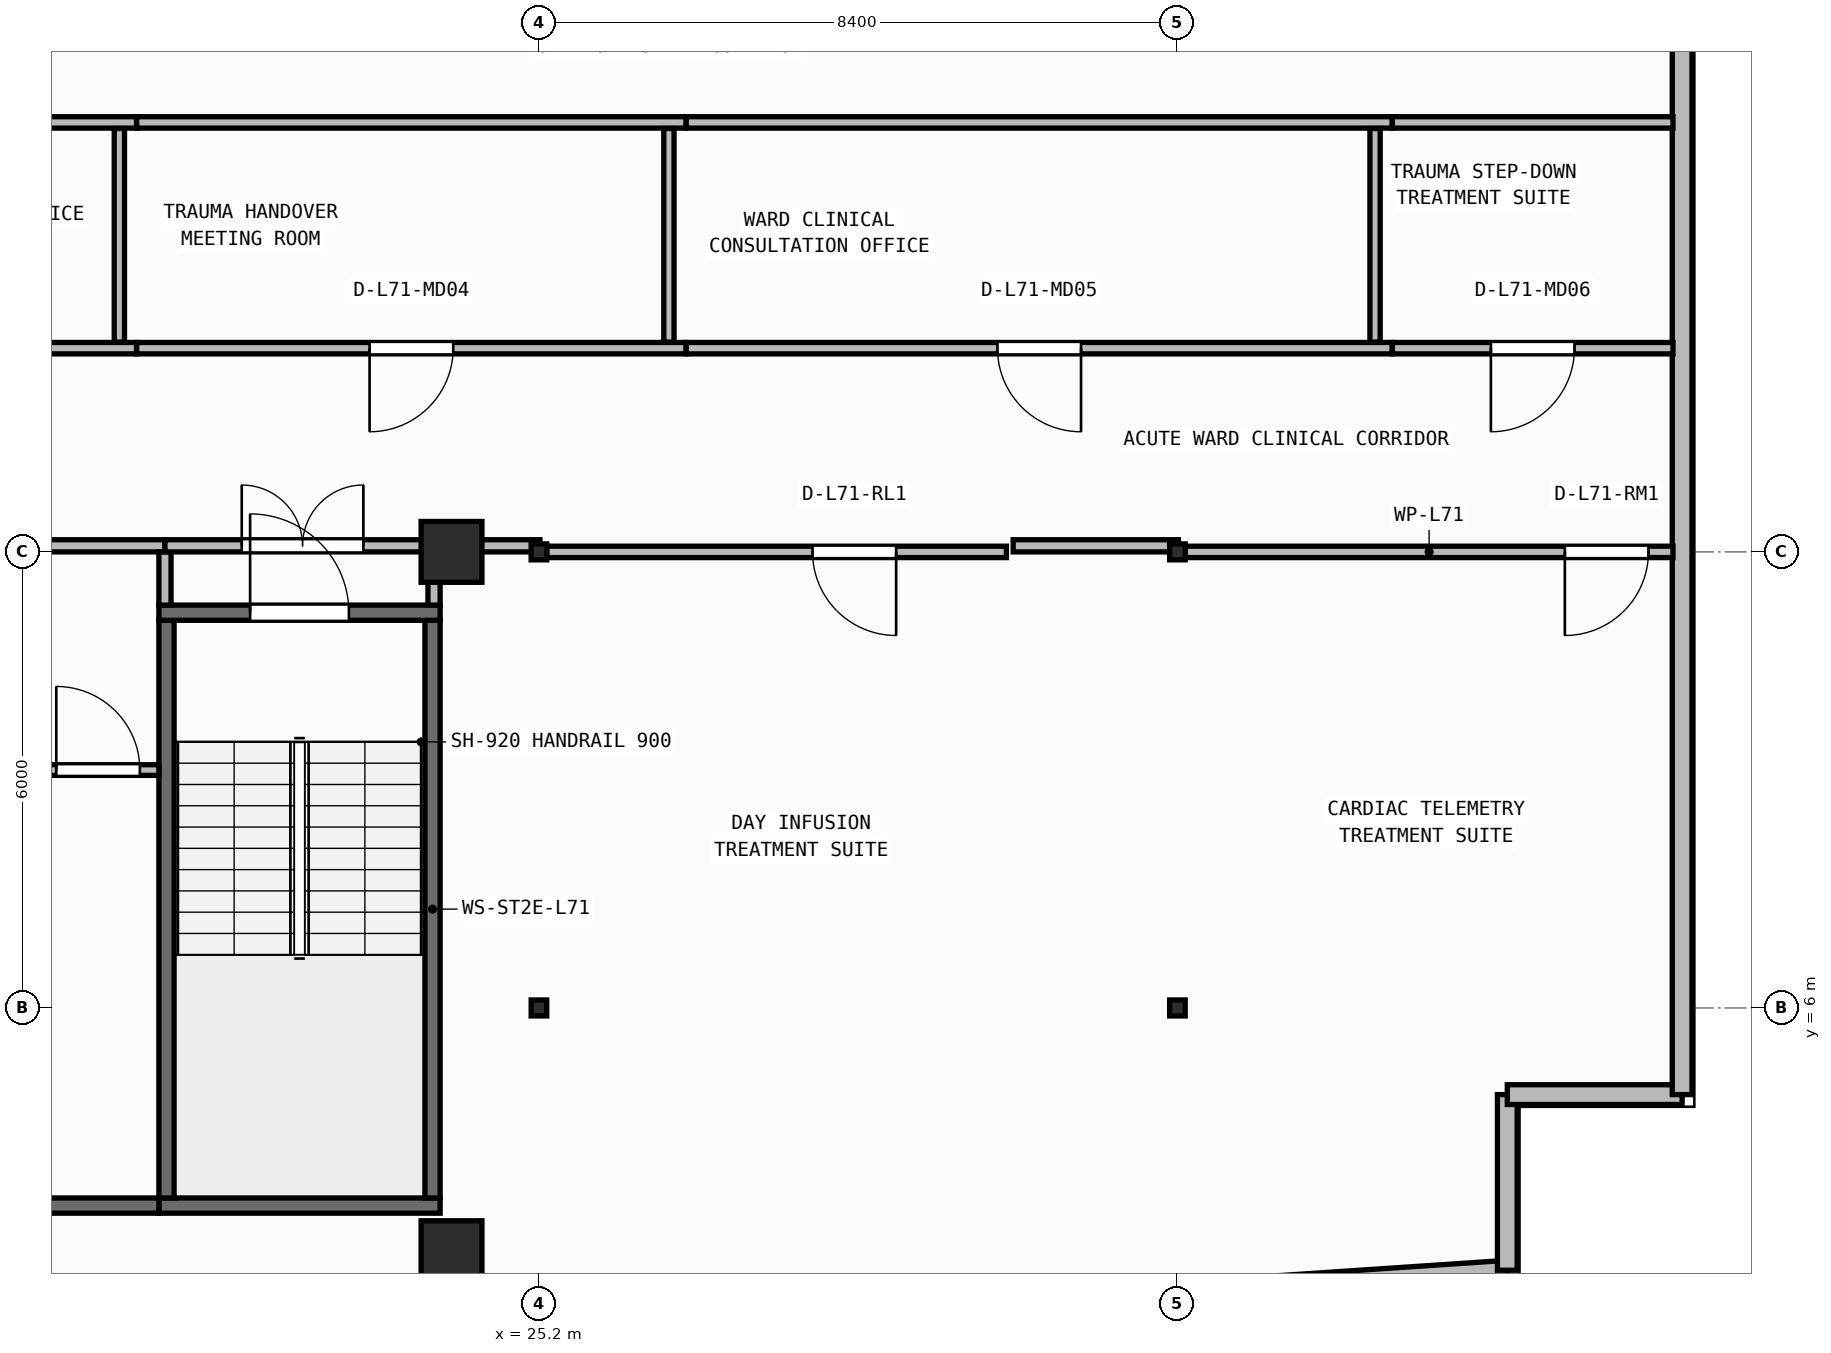
"""IFC4 building model, lengths in metres.
Left out: names, types, materials, properties, quantities, classifications, styles, units other than length and angle.
Written with IfcOpenShell. Run it as: python <this file> out.ifc"""

import sys

from ifc_helpers import new_model, si_unit, direction, frame, frame_2d, origin, origin_2d, place, context, subcontext, project, spatial, rectangle, i_section, extrude, element, fill, save


model = new_model("IFC4")
c1 = context("Model", 3, precision=1e-05, world=origin(), true_north=direction((0.0, 1.0)))
c2 = subcontext(c1, "Body", "Model", "MODEL_VIEW")
j1 = project(units=[si_unit("LENGTHUNIT", "METRE"), si_unit("PLANEANGLEUNIT", "RADIAN")], contexts=[c1])
p1 = place(None, origin())
s1 = spatial("IfcSite", under=j1, at=p1, CompositionType="ELEMENT")
p2 = place(p1, origin())
s2 = spatial("IfcBuilding", under=s1, at=p2, CompositionType="ELEMENT")
p3 = place(p2, frame((0.0, 0.0, 288.15)))
s3 = spatial("IfcBuildingStorey", under=s2, at=p3, CompositionType="ELEMENT", Elevation=288.15)
p4 = place(p3, frame((24.05, 2.8, 0.0), z_axis=(0.0, 0.0, 1.0), x_axis=(1.0, 0.0, 0.0)))
e1 = element("IfcColumn", 1, at=p4, inside=s3, PredefinedType="COLUMN", context=c2, shape_type="SweptSolid", body=[
    extrude(rectangle(XDim=0.8, YDim=0.8, at=origin_2d()), origin(), (0.0, 0.0, 1.0), 3.95),
])
for number, where, z_axis, x_axis in (
    (2, (25.2, 6.0, 0.0), (0.0, 0.0, 1.0), (1.0, 0.0, 0.0)),
    (3, (33.6, 6.0, 0.0), (0.0, 0.0, 1.0), (1.0, 0.0, 0.0)),
):
    element("IfcColumn", number, at=place(p3, frame(where, z_axis=z_axis, x_axis=x_axis)), inside=s3, PredefinedType="COLUMN", context=c2, shape_type="SweptSolid", body=[
        extrude(i_section(OverallWidth=0.205, OverallDepth=0.21, WebThickness=0.009, FlangeThickness=0.014, FilletRadius=0.011, at=origin_2d()), origin(), (0.0, 0.0, 1.0), 3.95),
    ])
p5 = place(p3, frame((24.05, 12.0, 0.0), z_axis=(0.0, 0.0, 1.0), x_axis=(1.0, 0.0, 0.0)))
e4 = element("IfcColumn", 4, at=p5, inside=s3, PredefinedType="COLUMN", context=c2, shape_type="SweptSolid", body=[
    extrude(rectangle(XDim=0.8, YDim=0.8, at=origin_2d()), origin(), (0.0, 0.0, 1.0), 3.95),
])
for number, where, z_axis, x_axis in (
    (5, (25.2, 12.0, 0.0), (0.0, 0.0, 1.0), (1.0, 0.0, 0.0)),
    (6, (33.6, 12.0, 0.0), (0.0, 0.0, 1.0), (1.0, 0.0, 0.0)),
):
    element("IfcColumn", number, at=place(p3, frame(where, z_axis=z_axis, x_axis=x_axis)), inside=s3, PredefinedType="COLUMN", context=c2, shape_type="SweptSolid", body=[
        extrude(i_section(OverallWidth=0.205, OverallDepth=0.21, WebThickness=0.009, FlangeThickness=0.014, FilletRadius=0.011, at=origin_2d()), origin(), (0.0, 0.0, 1.0), 3.95),
    ])
p6 = place(p3, frame((2.46, 0.171, 0.0), z_axis=(0.0, 0.0, 1.0), x_axis=(0.997760665813, 0.066885377746, 0.0)))
e7 = element("IfcWall", 7, at=p6, inside=s3, PredefinedType="STANDARD", context=c2, shape_type="SweptSolid", body=[
    extrude(rectangle(XDim=35.56, YDim=0.26, at=frame_2d((17.78, 0.0))), origin(), (0.0, 0.0, 1.0), 3.71),
])
p7 = place(p6, frame((16.58, 0.0, 0.9)))
e8 = element("IfcOpeningElement", 8, at=p7, cuts=e7, PredefinedType="OPENING", context=c2, shape_type="SweptSolid", body=[
    extrude(rectangle(XDim=2.4, YDim=1.65, at=frame_2d((1.2, 0.825))), frame((0.0, 0.14, 0.0), z_axis=(0.0, -1.0, 0.0), x_axis=(1.0, 0.0, 0.0)), (0.0, 0.0, 1.0), 0.28),
])
p8 = place(p3, frame((37.94, 2.55, 0.0), z_axis=(0.0, 0.0, 1.0), x_axis=(0.0, 1.0, 0.0)))
e9 = element("IfcWall", 9, at=p8, inside=s3, PredefinedType="STANDARD", context=c2, shape_type="SweptSolid", body=[
    extrude(rectangle(XDim=2.311, YDim=0.26, at=frame_2d((1.155, 0.0))), origin(), (0.0, 0.0, 1.0), 3.71),
])
p9 = place(p3, frame((37.94, 4.86, 0.0), z_axis=(0.0, 0.0, 1.0), x_axis=(1.0, 0.0, 0.0)))
e10 = element("IfcWall", 10, at=p9, inside=s3, PredefinedType="STANDARD", context=c2, shape_type="SweptSolid", body=[
    extrude(rectangle(XDim=2.3, YDim=0.26, at=frame_2d((1.15, 0.0))), origin(), (0.0, 0.0, 1.0), 3.71),
])
p10 = place(p3, frame((40.24, 4.86, 0.0), z_axis=(0.0, 0.0, 1.0), x_axis=(0.0, 1.0, 0.0)))
e11 = element("IfcWall", 11, at=p10, inside=s3, PredefinedType="STANDARD", context=c2, shape_type="SweptSolid", body=[
    extrude(rectangle(XDim=20.48, YDim=0.26, at=frame_2d((10.24, 0.0))), origin(), (0.0, 0.0, 1.0), 3.71),
])
p11 = place(p10, frame((15.445, 0.0, 0.9)))
e12 = element("IfcOpeningElement", 12, at=p11, cuts=e11, PredefinedType="OPENING", context=c2, shape_type="SweptSolid", body=[
    extrude(rectangle(XDim=2.4, YDim=1.65, at=frame_2d((1.2, 0.825))), frame((0.0, 0.14, 0.0), z_axis=(0.0, -1.0, 0.0), x_axis=(1.0, 0.0, 0.0)), (0.0, 0.0, 1.0), 0.28),
])
p12 = place(p3, frame((20.2, 3.4, 0.0), z_axis=(0.0, 0.0, 1.0), x_axis=(1.0, 0.0, 0.0)))
e13 = element("IfcWall", 13, at=p12, inside=s3, PredefinedType="SHEAR", context=c2, shape_type="SweptSolid", body=[
    extrude(rectangle(XDim=3.7, YDim=0.2, at=frame_2d((1.85, 0.0))), origin(), (0.0, 0.0, 1.0), 3.71),
])
for number, where, z_axis, x_axis in (
    (14, (20.3, 3.5, 0.0), (0.0, 0.0, 1.0), (0.0, 1.0, 0.0)),
    (15, (23.8, 3.5, 0.0), (0.0, 0.0, 1.0), (0.0, 1.0, 0.0)),
):
    element("IfcWall", number, at=place(p3, frame(where, z_axis=z_axis, x_axis=x_axis)), inside=s3, PredefinedType="SHEAR", context=c2, shape_type="SweptSolid", body=[
        extrude(rectangle(XDim=7.6, YDim=0.2, at=frame_2d((3.8, 0.0))), origin(), (0.0, 0.0, 1.0), 3.71),
    ])
p13 = place(p3, frame((20.2, 11.2, 0.0), z_axis=(0.0, 0.0, 1.0), x_axis=(1.0, 0.0, 0.0)))
e16 = element("IfcWall", 16, at=p13, inside=s3, PredefinedType="SHEAR", context=c2, shape_type="SweptSolid", body=[
    extrude(rectangle(XDim=3.7, YDim=0.2, at=frame_2d((1.85, 0.0))), origin(), (0.0, 0.0, 1.0), 3.71),
])
p14 = place(p13, frame((1.2, 0.0, 0.0)))
e17 = element("IfcOpeningElement", 17, at=p14, cuts=e16, PredefinedType="OPENING", context=c2, shape_type="SweptSolid", body=[
    extrude(rectangle(XDim=1.3, YDim=2.15, at=frame_2d((0.65, 1.075))), frame((0.0, 0.11, 0.0), z_axis=(0.0, -1.0, 0.0), x_axis=(1.0, 0.0, 0.0)), (0.0, 0.0, 1.0), 0.22),
])
p15 = place(p3, frame((6.5, 3.4, 0.0), z_axis=(0.0, 0.0, 1.0), x_axis=(1.0, 0.0, 0.0)))
e18 = element("IfcWall", 18, at=p15, inside=s3, PredefinedType="SHEAR", context=c2, shape_type="SweptSolid", body=[
    extrude(rectangle(XDim=13.7, YDim=0.2, at=frame_2d((6.85, 0.0))), origin(), (0.0, 0.0, 1.0), 3.71),
])
p16 = place(p3, frame((18.61, 9.13, 0.0), z_axis=(0.0, 0.0, 1.0), x_axis=(1.0, 0.0, 0.0)))
e19 = element("IfcWall", 19, at=p16, inside=s3, PredefinedType="PARTITIONING", context=c2, shape_type="SweptSolid", body=[
    extrude(rectangle(XDim=1.59, YDim=0.14, at=frame_2d((0.795, 0.0))), origin(), (0.0, 0.0, 1.0), 3.71),
])
p17 = place(p16, frame((0.24, 0.0, 0.0)))
e20 = element("IfcOpeningElement", 20, at=p17, cuts=e19, PredefinedType="OPENING", context=c2, shape_type="SweptSolid", body=[
    extrude(rectangle(XDim=1.1, YDim=2.1, at=frame_2d((0.55, 1.05))), frame((0.0, 0.08, 0.0), z_axis=(0.0, -1.0, 0.0), x_axis=(1.0, 0.0, 0.0)), (0.0, 0.0, 1.0), 0.16),
])
p18 = place(p3, frame((12.58, 12.08, 0.0), z_axis=(0.0, 0.0, 1.0), x_axis=(1.0, 0.0, 0.0)))
e21 = element("IfcWall", 21, at=p18, inside=s3, PredefinedType="PARTITIONING", context=c2, shape_type="SweptSolid", body=[
    extrude(rectangle(XDim=7.7, YDim=0.16, at=frame_2d((3.85, 0.0))), origin(), (0.0, 0.0, 1.0), 3.157),
])
p19 = place(p18, frame((3.05, 0.0, 0.0)))
e22 = element("IfcOpeningElement", 22, at=p19, cuts=e21, PredefinedType="OPENING", context=c2, shape_type="SweptSolid", body=[
    extrude(rectangle(XDim=1.6, YDim=2.05, at=frame_2d((0.8, 1.025))), frame((0.0, 0.09, 0.0), z_axis=(0.0, -1.0, 0.0), x_axis=(1.0, 0.0, 0.0)), (0.0, 0.0, 1.0), 0.18),
])
p20 = place(p3, frame((20.28, 11.3, 0.0), z_axis=(0.0, 0.0, 1.0), x_axis=(0.0, 1.0, 0.0)))
e23 = element("IfcWall", 23, at=p20, inside=s3, PredefinedType="PARTITIONING", context=c2, shape_type="SweptSolid", body=[
    extrude(rectangle(XDim=0.7, YDim=0.16, at=frame_2d((0.35, 0.0))), origin(), (0.0, 0.0, 1.0), 3.71),
])
p21 = place(p3, frame((20.28, 12.08, 0.0), z_axis=(0.0, 0.0, 1.0), x_axis=(1.0, 0.0, 0.0)))
e24 = element("IfcWall", 24, at=p21, inside=s3, PredefinedType="PARTITIONING", context=c2, shape_type="SweptSolid", body=[
    extrude(rectangle(XDim=3.62, YDim=0.16, at=frame_2d((1.81, 0.0))), origin(), (0.0, 0.0, 1.0), 3.157),
])
p22 = place(p21, frame((1.01, 0.0, 0.0)))
e25 = element("IfcOpeningElement", 25, at=p22, cuts=e24, PredefinedType="OPENING", context=c2, shape_type="SweptSolid", body=[
    extrude(rectangle(XDim=1.6, YDim=2.05, at=frame_2d((0.8, 1.025))), frame((0.0, 0.09, 0.0), z_axis=(0.0, -1.0, 0.0), x_axis=(1.0, 0.0, 0.0)), (0.0, 0.0, 1.0), 0.18),
])
p23 = place(p3, frame((23.82, 11.3, 0.0), z_axis=(0.0, 0.0, 1.0), x_axis=(0.0, 1.0, 0.0)))
e26 = element("IfcWall", 26, at=p23, inside=s3, PredefinedType="PARTITIONING", context=c2, shape_type="SweptSolid", body=[
    extrude(rectangle(XDim=0.7, YDim=0.16, at=frame_2d((0.35, 0.0))), origin(), (0.0, 0.0, 1.0), 3.71),
])
p24 = place(p3, frame((31.35, 12.0, 0.0), z_axis=(0.0, 0.0, 1.0), x_axis=(-1.0, 0.0, 0.0)))
e27 = element("IfcWall", 27, at=p24, inside=s3, PredefinedType="PARTITIONING", context=c2, shape_type="SweptSolid", body=[
    extrude(rectangle(XDim=6.048, YDim=0.15, at=frame_2d((3.024, 0.0))), origin(), (0.0, 0.0, 1.0), 3.157),
])
p25 = place(p24, frame((1.451, 0.0, 0.0)))
e28 = element("IfcOpeningElement", 28, at=p25, cuts=e27, PredefinedType="OPENING", context=c2, shape_type="SweptSolid", body=[
    extrude(rectangle(XDim=1.1, YDim=2.1, at=frame_2d((0.55, 1.05))), frame((0.0, 0.085, 0.0), z_axis=(0.0, -1.0, 0.0), x_axis=(1.0, 0.0, 0.0)), (0.0, 0.0, 1.0), 0.17),
])
p26 = place(p3, frame((40.12, 12.0, 0.0), z_axis=(0.0, 0.0, 1.0), x_axis=(-1.0, 0.0, 0.0)))
e29 = element("IfcWall", 29, at=p26, inside=s3, PredefinedType="PARTITIONING", context=c2, shape_type="SweptSolid", body=[
    extrude(rectangle(XDim=6.418, YDim=0.15, at=frame_2d((3.209, 0.0))), origin(), (0.0, 0.0, 1.0), 3.71),
])
p27 = place(p26, frame((0.323, 0.0, 0.0)))
e30 = element("IfcOpeningElement", 30, at=p27, cuts=e29, PredefinedType="OPENING", context=c2, shape_type="SweptSolid", body=[
    extrude(rectangle(XDim=1.1, YDim=2.1, at=frame_2d((0.55, 1.05))), frame((0.0, 0.085, 0.0), z_axis=(0.0, -1.0, 0.0), x_axis=(1.0, 0.0, 0.0)), (0.0, 0.0, 1.0), 0.17),
])
p28 = place(p3, frame((19.906, 14.68, 0.0), z_axis=(0.0, 0.0, 1.0), x_axis=(-1.0, 0.0, 0.0)))
e31 = element("IfcWall", 31, at=p28, inside=s3, PredefinedType="PARTITIONING", context=c2, shape_type="SweptSolid", body=[
    extrude(rectangle(XDim=6.352, YDim=0.15, at=frame_2d((3.176, 0.0))), origin(), (0.0, 0.0, 1.0), 3.71),
])
p29 = place(p28, frame((2.626, 0.0, 0.0)))
e32 = element("IfcOpeningElement", 32, at=p29, cuts=e31, PredefinedType="OPENING", context=c2, shape_type="SweptSolid", body=[
    extrude(rectangle(XDim=1.1, YDim=2.1, at=frame_2d((0.55, 1.05))), frame((0.0, 0.085, 0.0), z_axis=(0.0, -1.0, 0.0), x_axis=(1.0, 0.0, 0.0)), (0.0, 0.0, 1.0), 0.17),
])
p30 = place(p3, frame((27.136, 14.68, 0.0), z_axis=(0.0, 0.0, 1.0), x_axis=(-1.0, 0.0, 0.0)))
e33 = element("IfcWall", 33, at=p30, inside=s3, PredefinedType="PARTITIONING", context=c2, shape_type="SweptSolid", body=[
    extrude(rectangle(XDim=7.228, YDim=0.15, at=frame_2d((3.614, 0.0))), origin(), (0.0, 0.0, 1.0), 3.71),
])
p31 = place(p30, frame((3.064, 0.0, 0.0)))
e34 = element("IfcOpeningElement", 34, at=p31, cuts=e33, PredefinedType="OPENING", context=c2, shape_type="SweptSolid", body=[
    extrude(rectangle(XDim=1.1, YDim=2.1, at=frame_2d((0.55, 1.05))), frame((0.0, 0.085, 0.0), z_axis=(0.0, -1.0, 0.0), x_axis=(1.0, 0.0, 0.0)), (0.0, 0.0, 1.0), 0.17),
])
p32 = place(p3, frame((36.426, 14.68, 0.0), z_axis=(0.0, 0.0, 1.0), x_axis=(-1.0, 0.0, 0.0)))
e35 = element("IfcWall", 35, at=p32, inside=s3, PredefinedType="PARTITIONING", context=c2, shape_type="SweptSolid", body=[
    extrude(rectangle(XDim=9.288, YDim=0.15, at=frame_2d((4.644, 0.0))), origin(), (0.0, 0.0, 1.0), 3.71),
])
p33 = place(p32, frame((4.094, 0.0, 0.0)))
e36 = element("IfcOpeningElement", 36, at=p33, cuts=e35, PredefinedType="OPENING", context=c2, shape_type="SweptSolid", body=[
    extrude(rectangle(XDim=1.1, YDim=2.1, at=frame_2d((0.55, 1.05))), frame((0.0, 0.085, 0.0), z_axis=(0.0, -1.0, 0.0), x_axis=(1.0, 0.0, 0.0)), (0.0, 0.0, 1.0), 0.17),
])
p34 = place(p3, frame((40.12, 14.68, 0.0), z_axis=(0.0, 0.0, 1.0), x_axis=(-1.0, 0.0, 0.0)))
e37 = element("IfcWall", 37, at=p34, inside=s3, PredefinedType="PARTITIONING", context=c2, shape_type="SweptSolid", body=[
    extrude(rectangle(XDim=3.692, YDim=0.15, at=frame_2d((1.846, 0.0))), origin(), (0.0, 0.0, 1.0), 3.71),
])
p35 = place(p34, frame((1.296, 0.0, 0.0)))
e38 = element("IfcOpeningElement", 38, at=p35, cuts=e37, PredefinedType="OPENING", context=c2, shape_type="SweptSolid", body=[
    extrude(rectangle(XDim=1.1, YDim=2.1, at=frame_2d((0.55, 1.05))), frame((0.0, 0.085, 0.0), z_axis=(0.0, -1.0, 0.0), x_axis=(1.0, 0.0, 0.0)), (0.0, 0.0, 1.0), 0.17),
])
p36 = place(p3, frame((13.72, 17.65, 0.0), z_axis=(0.0, 0.0, 1.0), x_axis=(1.0, 0.0, 0.0)))
e39 = element("IfcWall", 39, at=p36, inside=s3, PredefinedType="PARTITIONING", context=c2, shape_type="SweptSolid", body=[
    extrude(rectangle(XDim=6.186, YDim=0.15, at=frame_2d((3.093, 0.0))), origin(), (0.0, 0.0, 1.0), 3.71),
])
p37 = place(p3, frame((19.908, 17.65, 0.0), z_axis=(0.0, 0.0, 1.0), x_axis=(1.0, 0.0, 0.0)))
e40 = element("IfcWall", 40, at=p37, inside=s3, PredefinedType="PARTITIONING", context=c2, shape_type="SweptSolid", body=[
    extrude(rectangle(XDim=7.228, YDim=0.15, at=frame_2d((3.614, 0.0))), origin(), (0.0, 0.0, 1.0), 3.71),
])
p38 = place(p3, frame((27.138, 17.65, 0.0), z_axis=(0.0, 0.0, 1.0), x_axis=(1.0, 0.0, 0.0)))
e41 = element("IfcWall", 41, at=p38, inside=s3, PredefinedType="PARTITIONING", context=c2, shape_type="SweptSolid", body=[
    extrude(rectangle(XDim=9.288, YDim=0.15, at=frame_2d((4.644, 0.0))), origin(), (0.0, 0.0, 1.0), 3.71),
])
p39 = place(p3, frame((36.428, 17.65, 0.0), z_axis=(0.0, 0.0, 1.0), x_axis=(1.0, 0.0, 0.0)))
e42 = element("IfcWall", 42, at=p39, inside=s3, PredefinedType="PARTITIONING", context=c2, shape_type="SweptSolid", body=[
    extrude(rectangle(XDim=3.692, YDim=0.15, at=frame_2d((1.846, 0.0))), origin(), (0.0, 0.0, 1.0), 3.71),
])
for number, where, z_axis, x_axis in (
    (43, (19.68, 14.76, 0.0), (0.0, 0.0, 1.0), (0.0, 1.0, 0.0)),
    (44, (26.91, 14.76, 0.0), (0.0, 0.0, 1.0), (0.0, 1.0, 0.0)),
    (45, (36.2, 14.76, 0.0), (0.0, 0.0, 1.0), (0.0, 1.0, 0.0)),
):
    element("IfcWall", number, at=place(p3, frame(where, z_axis=z_axis, x_axis=x_axis)), inside=s3, PredefinedType="PARTITIONING", context=c2, shape_type="SweptSolid", body=[
        extrude(rectangle(XDim=2.81, YDim=0.135, at=frame_2d((1.405, 0.0))), origin(), (0.0, 0.0, 1.0), 3.71),
    ])
p40 = place(p3, frame((24.02, 12.08, 0.0), z_axis=(0.0, 0.0, 1.0), x_axis=(1.0, 0.0, 0.0)))
e46 = element("IfcWall", 46, at=p40, inside=s3, PredefinedType="PARTITIONING", context=c2, shape_type="SweptSolid", body=[
    extrude(rectangle(XDim=1.193, YDim=0.16, at=frame_2d((0.597, 0.0))), origin(), (0.0, 0.0, 1.0), 3.157),
])
p41 = place(p3, frame((31.439, 12.08, 0.0), z_axis=(0.0, 0.0, 1.0), x_axis=(1.0, 0.0, 0.0)))
e47 = element("IfcWall", 47, at=p41, inside=s3, PredefinedType="PARTITIONING", context=c2, shape_type="SweptSolid", body=[
    extrude(rectangle(XDim=2.174, YDim=0.16, at=frame_2d((1.087, 0.0))), origin(), (0.0, 0.0, 1.0), 3.157),
])
p42 = place(p14, origin())
e48 = element("IfcDoor", 48, at=p42, inside=s3, OperationType="SINGLE_SWING_LEFT", PredefinedType="DOOR", context=c2, shape_type="SweptSolid", body=[
    extrude(rectangle(XDim=1.3, YDim=2.15, at=frame_2d((0.65, 1.075))), frame((0.0, 0.025, 0.0), z_axis=(0.0, -1.0, 0.0), x_axis=(1.0, 0.0, 0.0)), (0.0, 0.0, 1.0), 0.05),
])
fill(e17, e48)
p43 = place(p17, origin())
e49 = element("IfcDoor", 49, at=p43, inside=s3, OperationType="SINGLE_SWING_LEFT", PredefinedType="DOOR", context=c2, shape_type="SweptSolid", body=[
    extrude(rectangle(XDim=1.1, YDim=2.1, at=frame_2d((0.55, 1.05))), frame((0.0, 0.025, 0.0), z_axis=(0.0, -1.0, 0.0), x_axis=(1.0, 0.0, 0.0)), (0.0, 0.0, 1.0), 0.05),
])
fill(e20, e49)
p44 = place(p22, origin())
e50 = element("IfcDoor", 50, at=p44, inside=s3, OperationType="DOUBLE_DOOR_SINGLE_SWING", PredefinedType="DOOR", context=c2, shape_type="SweptSolid", body=[
    extrude(rectangle(XDim=1.6, YDim=2.05, at=frame_2d((0.8, 1.025))), frame((0.0, 0.025, 0.0), z_axis=(0.0, -1.0, 0.0), x_axis=(1.0, 0.0, 0.0)), (0.0, 0.0, 1.0), 0.05),
])
fill(e25, e50)
p45 = place(p25, origin())
e51 = element("IfcDoor", 51, at=p45, inside=s3, OperationType="SINGLE_SWING_LEFT", PredefinedType="DOOR", context=c2, shape_type="SweptSolid", body=[
    extrude(rectangle(XDim=1.1, YDim=2.1, at=frame_2d((0.55, 1.05))), frame((0.0, 0.025, 0.0), z_axis=(0.0, -1.0, 0.0), x_axis=(1.0, 0.0, 0.0)), (0.0, 0.0, 1.0), 0.05),
])
fill(e28, e51)
p46 = place(p27, origin())
e52 = element("IfcDoor", 52, at=p46, inside=s3, OperationType="SINGLE_SWING_RIGHT", PredefinedType="DOOR", context=c2, shape_type="SweptSolid", body=[
    extrude(rectangle(XDim=1.1, YDim=2.1, at=frame_2d((0.55, 1.05))), frame((0.0, 0.025, 0.0), z_axis=(0.0, -1.0, 0.0), x_axis=(1.0, 0.0, 0.0)), (0.0, 0.0, 1.0), 0.05),
])
fill(e30, e52)
p47 = place(p31, origin())
e53 = element("IfcDoor", 53, at=p47, inside=s3, OperationType="SINGLE_SWING_RIGHT", PredefinedType="DOOR", context=c2, shape_type="SweptSolid", body=[
    extrude(rectangle(XDim=1.1, YDim=2.1, at=frame_2d((0.55, 1.05))), frame((0.0, 0.025, 0.0), z_axis=(0.0, -1.0, 0.0), x_axis=(1.0, 0.0, 0.0)), (0.0, 0.0, 1.0), 0.05),
])
fill(e34, e53)
p48 = place(p33, origin())
e54 = element("IfcDoor", 54, at=p48, inside=s3, OperationType="SINGLE_SWING_LEFT", PredefinedType="DOOR", context=c2, shape_type="SweptSolid", body=[
    extrude(rectangle(XDim=1.1, YDim=2.1, at=frame_2d((0.55, 1.05))), frame((0.0, 0.025, 0.0), z_axis=(0.0, -1.0, 0.0), x_axis=(1.0, 0.0, 0.0)), (0.0, 0.0, 1.0), 0.05),
])
fill(e36, e54)
p49 = place(p35, origin())
e55 = element("IfcDoor", 55, at=p49, inside=s3, OperationType="SINGLE_SWING_RIGHT", PredefinedType="DOOR", context=c2, shape_type="SweptSolid", body=[
    extrude(rectangle(XDim=1.1, YDim=2.1, at=frame_2d((0.55, 1.05))), frame((0.0, 0.025, 0.0), z_axis=(0.0, -1.0, 0.0), x_axis=(1.0, 0.0, 0.0)), (0.0, 0.0, 1.0), 0.05),
])
fill(e38, e55)
save(model, sys.argv[1])
